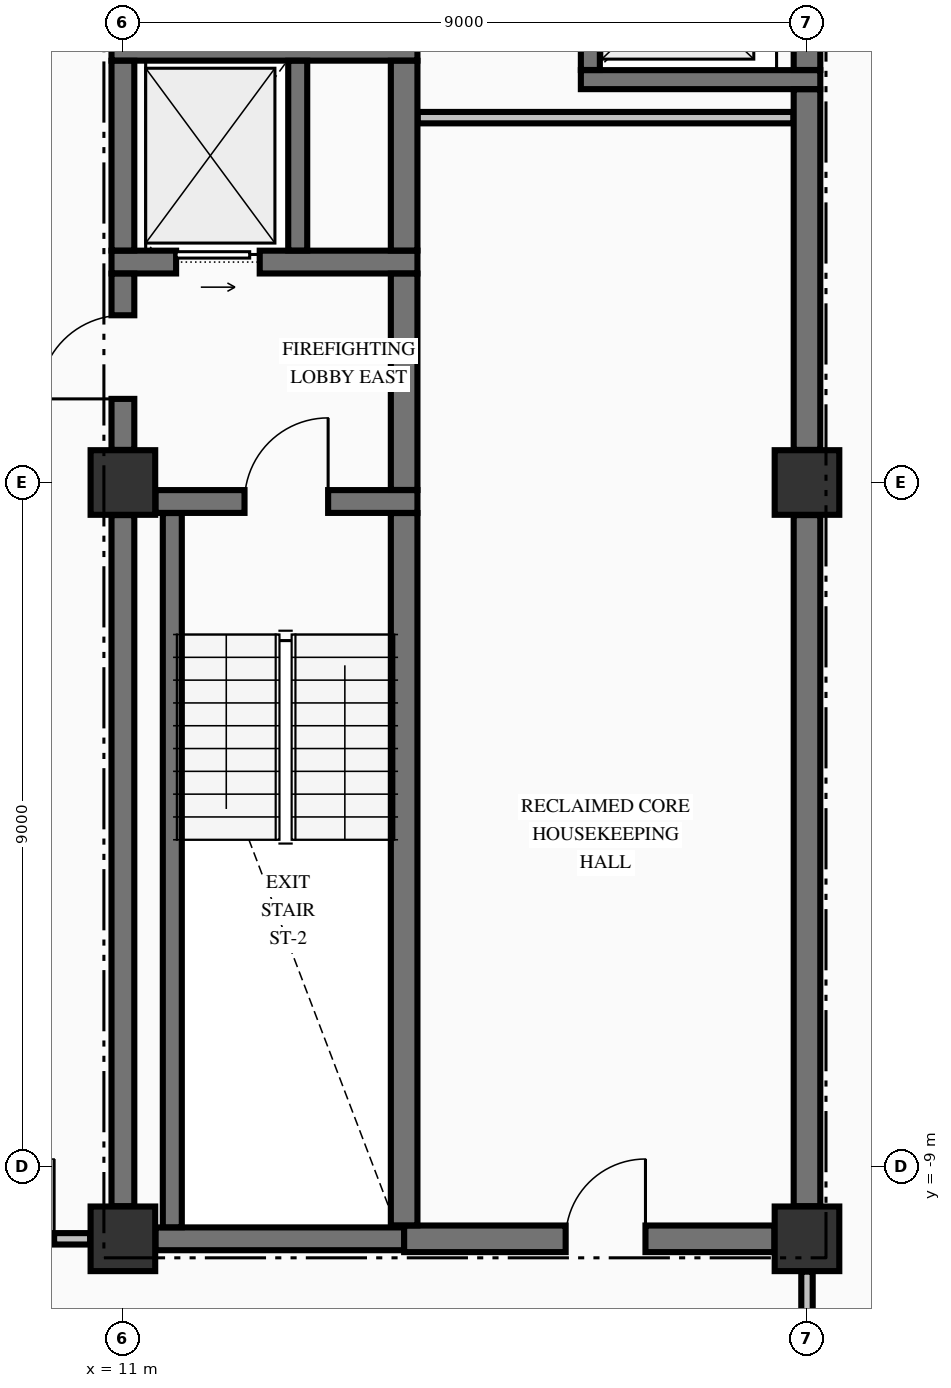
"""IFC4 building model, lengths in metres.
Left out: names, types, materials, properties, quantities, classifications, styles, units other than length and angle.
Written with IfcOpenShell. Run it as: python <this file> out.ifc"""

import sys

from ifc_helpers import new_model, si_unit, direction, frame, frame_2d, origin, origin_2d, place, context, subcontext, project, spatial, rectangle, extrude, element, fill, save


model = new_model("IFC4")
c1 = context("Model", 3, precision=1e-05, world=origin(), true_north=direction((0.0, 1.0)))
c2 = subcontext(c1, "Body", "Model", "MODEL_VIEW")
j1 = project(units=[si_unit("LENGTHUNIT", "METRE"), si_unit("PLANEANGLEUNIT", "RADIAN")], contexts=[c1])
p1 = place(None, origin())
s1 = spatial("IfcSite", under=j1, at=p1, CompositionType="ELEMENT")
p2 = place(p1, origin())
s2 = spatial("IfcBuilding", under=s1, at=p2, CompositionType="ELEMENT")
p3 = place(p2, frame((0.0, 0.0, 208.46)))
s3 = spatial("IfcBuildingStorey", under=s2, at=p3, CompositionType="ELEMENT", Elevation=208.46)
for number, where, z_axis, x_axis in (
    (1, (11.0, -9.95, -0.25), (0.0, 0.0, 1.0), (1.0, 0.0, 0.0)),
    (2, (11.0, 0.0, -0.25), (0.0, 0.0, 1.0), (1.0, 0.0, 0.0)),
    (3, (20.0, -9.95, -0.25), (0.0, 0.0, 1.0), (1.0, 0.0, 0.0)),
    (4, (20.0, 0.0, -0.25), (0.0, 0.0, 1.0), (1.0, 0.0, 0.0)),
):
    element("IfcColumn", number, at=place(p3, frame(where, z_axis=z_axis, x_axis=x_axis)), inside=s3, PredefinedType="COLUMN", context=c2, shape_type="SweptSolid", body=[
        extrude(rectangle(XDim=0.85, YDim=0.85, at=origin_2d()), origin(), (0.0, 0.0, 1.0), 3.325),
    ])
p4 = place(p3, frame((11.429, -9.95, 0.0), z_axis=(0.0, 0.0, 1.0), x_axis=(1.0, 0.0, 0.0)))
e5 = element("IfcWall", 5, at=p4, inside=s3, PredefinedType="SHEAR", context=c2, shape_type="SweptSolid", body=[
    extrude(rectangle(XDim=3.271, YDim=0.3, at=frame_2d((1.635, 0.0))), origin(), (0.0, 0.0, 1.0), 3.075),
])
p5 = place(p3, frame((14.7, -9.95, 0.0), z_axis=(0.0, 0.0, 1.0), x_axis=(1.0, 0.0, 0.0)))
e6 = element("IfcWall", 6, at=p5, inside=s3, PredefinedType="SHEAR", context=c2, shape_type="SweptSolid", body=[
    extrude(rectangle(XDim=4.871, YDim=0.35, at=frame_2d((2.436, 0.0))), origin(), (0.0, 0.0, 1.0), 3.075),
])
p6 = place(p5, frame((2.125, 0.0, 0.0)))
e7 = element("IfcOpeningElement", 7, at=p6, cuts=e6, PredefinedType="OPENING", context=c2, shape_type="SweptSolid", body=[
    extrude(rectangle(XDim=1.05, YDim=2.15, at=frame_2d((0.525, 1.075))), frame((0.0, 0.185, 0.0), z_axis=(0.0, -1.0, 0.0), x_axis=(1.0, 0.0, 0.0)), (0.0, 0.0, 1.0), 0.37),
])
p7 = place(p3, frame((11.429, -0.25, 0.0), z_axis=(0.0, 0.0, 1.0), x_axis=(1.0, 0.0, 0.0)))
e8 = element("IfcWall", 8, at=p7, inside=s3, PredefinedType="SHEAR", context=c2, shape_type="SweptSolid", body=[
    extrude(rectangle(XDim=3.446, YDim=0.3, at=frame_2d((1.723, 0.0))), origin(), (0.0, 0.0, 1.0), 3.075),
])
p8 = place(p7, frame((1.171, 0.0, 0.0)))
e9 = element("IfcOpeningElement", 9, at=p8, cuts=e8, PredefinedType="OPENING", context=c2, shape_type="SweptSolid", body=[
    extrude(rectangle(XDim=1.1, YDim=2.15, at=frame_2d((0.55, 1.075))), frame((0.0, 0.16, 0.0), z_axis=(0.0, -1.0, 0.0), x_axis=(1.0, 0.0, 0.0)), (0.0, 0.0, 1.0), 0.32),
])
p9 = place(p3, frame((10.85, 2.9, 0.0), z_axis=(0.0, 0.0, 1.0), x_axis=(1.0, 0.0, 0.0)))
e10 = element("IfcWall", 10, at=p9, inside=s3, PredefinedType="SHEAR", context=c2, shape_type="SweptSolid", body=[
    extrude(rectangle(XDim=4.025, YDim=0.3, at=frame_2d((2.012, 0.0))), origin(), (0.0, 0.0, 1.0), 3.075),
])
p10 = place(p9, frame((0.85, 0.0, 0.0)))
e11 = element("IfcOpeningElement", 11, at=p10, cuts=e10, PredefinedType="OPENING", context=c2, shape_type="SweptSolid", body=[
    extrude(rectangle(XDim=1.1, YDim=2.2, at=frame_2d((0.55, 1.1))), frame((0.0, 0.16, 0.0), z_axis=(0.0, -1.0, 0.0), x_axis=(1.0, 0.0, 0.0)), (0.0, 0.0, 1.0), 0.32),
])
p11 = place(p3, frame((17.025, 5.3, 0.0), z_axis=(0.0, 0.0, 1.0), x_axis=(1.0, 0.0, 0.0)))
e12 = element("IfcWall", 12, at=p11, inside=s3, PredefinedType="SOLIDWALL", context=c2, shape_type="SweptSolid", body=[
    extrude(rectangle(XDim=3.15, YDim=0.25, at=frame_2d((1.575, 0.0))), origin(), (0.0, 0.0, 1.0), 3.075),
])
p12 = place(p3, frame((10.85, 5.7, 0.0), z_axis=(0.0, 0.0, 1.0), x_axis=(1.0, 0.0, 0.0)))
e13 = element("IfcWall", 13, at=p12, inside=s3, PredefinedType="SHEAR", context=c2, shape_type="SweptSolid", body=[
    extrude(rectangle(XDim=4.025, YDim=0.3, at=frame_2d((2.012, 0.0))), origin(), (0.0, 0.0, 1.0), 3.075),
])
p13 = place(p3, frame((-10.569, -9.95, 0.0), z_axis=(0.0, 0.0, 1.0), x_axis=(1.0, 0.0, 0.0)))
e14 = element("IfcWall", 14, at=p13, inside=s3, PredefinedType="PARTITIONING", context=c2, shape_type="SweptSolid", body=[
    extrude(rectangle(XDim=21.138, YDim=0.15, at=frame_2d((10.569, 0.0))), origin(), (0.0, 0.0, 1.0), 3.075),
])
p14 = place(p13, frame((0.474, 0.0, 0.0)))
e15 = element("IfcOpeningElement", 15, at=p14, cuts=e14, PredefinedType="OPENING", context=c2, shape_type="SweptSolid", body=[
    extrude(rectangle(XDim=1.05, YDim=2.15, at=frame_2d((0.525, 1.075))), frame((0.0, 0.085, 0.0), z_axis=(0.0, -1.0, 0.0), x_axis=(1.0, 0.0, 0.0)), (0.0, 0.0, 1.0), 0.17),
])
p15 = place(p13, frame((19.614, 0.0, 0.0)))
e16 = element("IfcOpeningElement", 16, at=p15, cuts=e14, PredefinedType="OPENING", context=c2, shape_type="SweptSolid", body=[
    extrude(rectangle(XDim=1.05, YDim=2.15, at=frame_2d((0.525, 1.075))), frame((0.0, 0.085, 0.0), z_axis=(0.0, -1.0, 0.0), x_axis=(1.0, 0.0, 0.0)), (0.0, 0.0, 1.0), 0.17),
])
p16 = place(p13, frame((13.574, 0.0, 0.0)))
e17 = element("IfcOpeningElement", 17, at=p16, cuts=e14, PredefinedType="OPENING", context=c2, shape_type="SweptSolid", body=[
    extrude(rectangle(XDim=0.95, YDim=2.15, at=frame_2d((0.475, 1.075))), frame((0.0, 0.085, 0.0), z_axis=(0.0, -1.0, 0.0), x_axis=(1.0, 0.0, 0.0)), (0.0, 0.0, 1.0), 0.17),
])
p17 = place(p3, frame((14.878, 4.8, 0.0), z_axis=(0.0, 0.0, 1.0), x_axis=(1.0, 0.0, 0.0)))
e18 = element("IfcWall", 18, at=p17, inside=s3, PredefinedType="PARTITIONING", context=c2, shape_type="SweptSolid", body=[
    extrude(rectangle(XDim=4.944, YDim=0.15, at=frame_2d((2.472, 0.0))), origin(), (0.0, 0.0, 1.0), 3.075),
])
p18 = place(p3, frame((11.0, -9.521, 0.0), z_axis=(0.0, 0.0, 1.0), x_axis=(0.0, 1.0, 0.0)))
e19 = element("IfcWall", 19, at=p18, inside=s3, PredefinedType="SHEAR", context=c2, shape_type="SweptSolid", body=[
    extrude(rectangle(XDim=9.092, YDim=0.3, at=frame_2d((4.546, 0.0))), origin(), (0.0, 0.0, 1.0), 3.075),
])
p19 = place(p3, frame((11.0, 0.429, 0.0), z_axis=(0.0, 0.0, 1.0), x_axis=(0.0, 1.0, 0.0)))
e20 = element("IfcWall", 20, at=p19, inside=s3, PredefinedType="SHEAR", context=c2, shape_type="SweptSolid", body=[
    extrude(rectangle(XDim=2.319, YDim=0.3, at=frame_2d((1.16, 0.0))), origin(), (0.0, 0.0, 1.0), 3.075),
])
p20 = place(p19, frame((0.671, 0.0, 0.0)))
e21 = element("IfcOpeningElement", 21, at=p20, cuts=e20, PredefinedType="OPENING", context=c2, shape_type="SweptSolid", body=[
    extrude(rectangle(XDim=1.1, YDim=2.15, at=frame_2d((0.55, 1.075))), frame((0.0, 0.16, 0.0), z_axis=(0.0, -1.0, 0.0), x_axis=(1.0, 0.0, 0.0)), (0.0, 0.0, 1.0), 0.32),
])
p21 = place(p3, frame((11.0, 3.052, 0.0), z_axis=(0.0, 0.0, 1.0), x_axis=(0.0, 1.0, 0.0)))
e22 = element("IfcWall", 22, at=p21, inside=s3, PredefinedType="SHEAR", context=c2, shape_type="SweptSolid", body=[
    extrude(rectangle(XDim=2.496, YDim=0.3, at=frame_2d((1.248, 0.0))), origin(), (0.0, 0.0, 1.0), 3.075),
])
p22 = place(p3, frame((11.65, -9.798, 0.0), z_axis=(0.0, 0.0, 1.0), x_axis=(0.0, 1.0, 0.0)))
e23 = element("IfcWall", 23, at=p22, inside=s3, PredefinedType="SOLIDWALL", context=c2, shape_type="SweptSolid", body=[
    extrude(rectangle(XDim=9.396, YDim=0.25, at=frame_2d((4.698, 0.0))), origin(), (0.0, 0.0, 1.0), 3.075),
])
p23 = place(p3, frame((13.3, 3.052, 0.0), z_axis=(0.0, 0.0, 1.0), x_axis=(0.0, 1.0, 0.0)))
e24 = element("IfcWall", 24, at=p23, inside=s3, PredefinedType="SOLIDWALL", context=c2, shape_type="SweptSolid", body=[
    extrude(rectangle(XDim=2.496, YDim=0.25, at=frame_2d((1.248, 0.0))), origin(), (0.0, 0.0, 1.0), 3.075),
])
p24 = place(p3, frame((14.7, -9.773, 0.0), z_axis=(0.0, 0.0, 1.0), x_axis=(0.0, 1.0, 0.0)))
e25 = element("IfcWall", 25, at=p24, inside=s3, PredefinedType="SHEAR", context=c2, shape_type="SweptSolid", body=[
    extrude(rectangle(XDim=9.371, YDim=0.35, at=frame_2d((4.686, 0.0))), origin(), (0.0, 0.0, 1.0), 3.075),
])
p25 = place(p3, frame((14.7, -0.098, 0.0), z_axis=(0.0, 0.0, 1.0), x_axis=(0.0, 1.0, 0.0)))
e26 = element("IfcWall", 26, at=p25, inside=s3, PredefinedType="SHEAR", context=c2, shape_type="SweptSolid", body=[
    extrude(rectangle(XDim=2.846, YDim=0.35, at=frame_2d((1.423, 0.0))), origin(), (0.0, 0.0, 1.0), 3.075),
])
p26 = place(p3, frame((14.7, 3.052, 0.0), z_axis=(0.0, 0.0, 1.0), x_axis=(0.0, 1.0, 0.0)))
e27 = element("IfcWall", 27, at=p26, inside=s3, PredefinedType="SHEAR", context=c2, shape_type="SweptSolid", body=[
    extrude(rectangle(XDim=2.496, YDim=0.35, at=frame_2d((1.248, 0.0))), origin(), (0.0, 0.0, 1.0), 3.075),
])
p27 = place(p3, frame((17.15, 5.427, 0.0), z_axis=(0.0, 0.0, 1.0), x_axis=(0.0, 1.0, 0.0)))
e28 = element("IfcWall", 28, at=p27, inside=s3, PredefinedType="SOLIDWALL", context=c2, shape_type="SweptSolid", body=[
    extrude(rectangle(XDim=2.196, YDim=0.25, at=frame_2d((1.098, 0.0))), origin(), (0.0, 0.0, 1.0), 3.075),
])
p28 = place(p27, frame((0.548, 0.0, 0.0)))
e29 = element("IfcOpeningElement", 29, at=p28, cuts=e28, PredefinedType="OPENING", context=c2, shape_type="SweptSolid", body=[
    extrude(rectangle(XDim=1.1, YDim=2.2, at=frame_2d((0.55, 1.1))), frame((0.0, 0.135, 0.0), z_axis=(0.0, -1.0, 0.0), x_axis=(1.0, 0.0, 0.0)), (0.0, 0.0, 1.0), 0.27),
])
p29 = place(p3, frame((20.0, -9.521, 0.0), z_axis=(0.0, 0.0, 1.0), x_axis=(0.0, 1.0, 0.0)))
e30 = element("IfcWall", 30, at=p29, inside=s3, PredefinedType="SHEAR", context=c2, shape_type="SweptSolid", body=[
    extrude(rectangle(XDim=9.092, YDim=0.35, at=frame_2d((4.546, 0.0))), origin(), (0.0, 0.0, 1.0), 3.075),
])
p30 = place(p3, frame((20.0, 0.429, 0.0), z_axis=(0.0, 0.0, 1.0), x_axis=(0.0, 1.0, 0.0)))
e31 = element("IfcWall", 31, at=p30, inside=s3, PredefinedType="SHEAR", context=c2, shape_type="SweptSolid", body=[
    extrude(rectangle(XDim=4.744, YDim=0.35, at=frame_2d((2.372, 0.0))), origin(), (0.0, 0.0, 1.0), 3.075),
])
p31 = place(p3, frame((20.0, 5.427, 0.0), z_axis=(0.0, 0.0, 1.0), x_axis=(0.0, 1.0, 0.0)))
e32 = element("IfcWall", 32, at=p31, inside=s3, PredefinedType="SHEAR", context=c2, shape_type="SweptSolid", body=[
    extrude(rectangle(XDim=2.196, YDim=0.35, at=frame_2d((1.098, 0.0))), origin(), (0.0, 0.0, 1.0), 3.075),
])
p32 = place(p3, frame((20.0, -13.022, 0.0), z_axis=(0.0, 0.0, 1.0), x_axis=(0.0, 1.0, 0.0)))
e33 = element("IfcWall", 33, at=p32, inside=s3, PredefinedType="PARTITIONING", context=c2, shape_type="SweptSolid", body=[
    extrude(rectangle(XDim=2.641, YDim=0.15, at=frame_2d((1.32, 0.0))), origin(), (0.0, 0.0, 1.0), 2.267),
])
p33 = place(p8, origin())
e34 = element("IfcDoor", 34, at=p33, inside=s3, OperationType="SINGLE_SWING_RIGHT", PredefinedType="DOOR", context=c2, shape_type="SweptSolid", body=[
    extrude(rectangle(XDim=1.1, YDim=2.15, at=frame_2d((0.55, 1.075))), frame((0.0, 0.025, 0.0), z_axis=(0.0, -1.0, 0.0), x_axis=(1.0, 0.0, 0.0)), (0.0, 0.0, 1.0), 0.05),
])
fill(e9, e34)
p34 = place(p20, origin())
e35 = element("IfcDoor", 35, at=p34, inside=s3, OperationType="SINGLE_SWING_LEFT", PredefinedType="DOOR", context=c2, shape_type="SweptSolid", body=[
    extrude(rectangle(XDim=1.1, YDim=2.15, at=frame_2d((0.55, 1.075))), frame((0.0, 0.025, 0.0), z_axis=(0.0, -1.0, 0.0), x_axis=(1.0, 0.0, 0.0)), (0.0, 0.0, 1.0), 0.05),
])
fill(e21, e35)
p35 = place(p10, origin())
e36 = element("IfcDoor", 36, at=p35, inside=s3, OperationType="SLIDING_TO_RIGHT", PredefinedType="DOOR", context=c2, shape_type="SweptSolid", body=[
    extrude(rectangle(XDim=1.1, YDim=2.2, at=frame_2d((0.55, 1.1))), frame((0.0, 0.025, 0.0), z_axis=(0.0, -1.0, 0.0), x_axis=(1.0, 0.0, 0.0)), (0.0, 0.0, 1.0), 0.05),
])
fill(e11, e36)
p36 = place(p6, origin())
e37 = element("IfcDoor", 37, at=p36, inside=s3, OperationType="SINGLE_SWING_RIGHT", PredefinedType="DOOR", context=c2, shape_type="SweptSolid", body=[
    extrude(rectangle(XDim=1.05, YDim=2.15, at=frame_2d((0.525, 1.075))), frame((0.0, 0.025, 0.0), z_axis=(0.0, -1.0, 0.0), x_axis=(1.0, 0.0, 0.0)), (0.0, 0.0, 1.0), 0.05),
])
fill(e7, e37)
p37 = place(p15, origin())
e38 = element("IfcDoor", 38, at=p37, inside=s3, OperationType="SINGLE_SWING_RIGHT", PredefinedType="DOOR", context=c2, shape_type="SweptSolid", body=[
    extrude(rectangle(XDim=1.05, YDim=2.15, at=frame_2d((0.525, 1.075))), frame((0.0, 0.025, 0.0), z_axis=(0.0, -1.0, 0.0), x_axis=(1.0, 0.0, 0.0)), (0.0, 0.0, 1.0), 0.05),
])
fill(e16, e38)
save(model, sys.argv[1])
